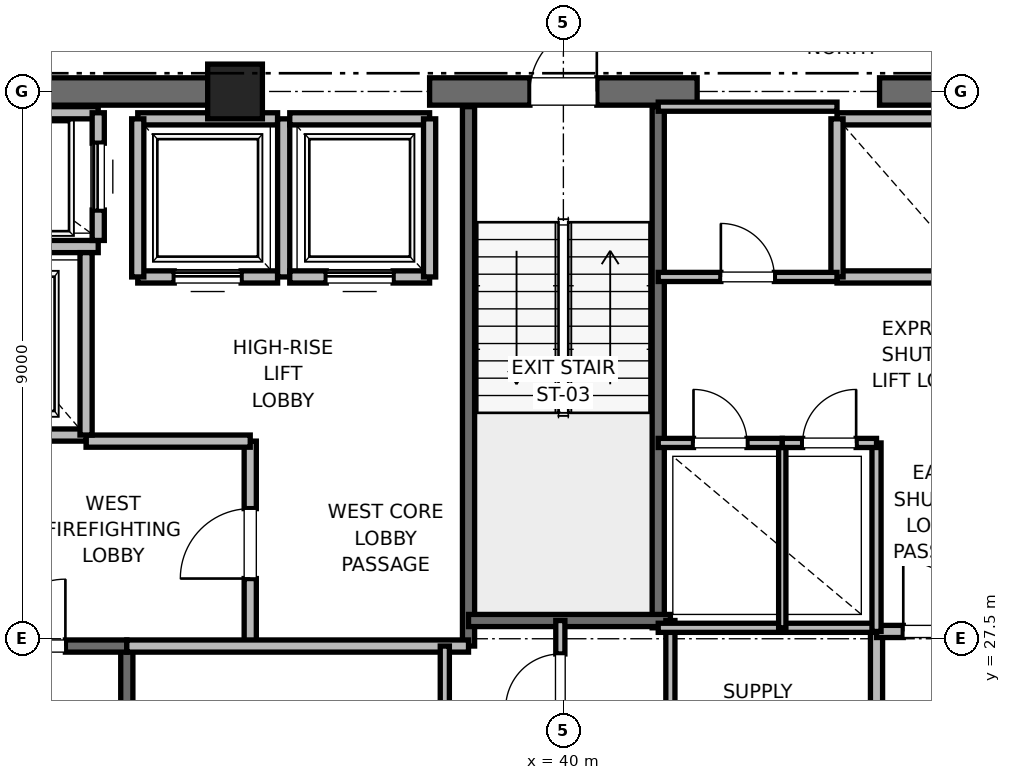
"""IFC4 building model, lengths in metres.
Left out: names, types, materials, properties, quantities, classifications, styles, units other than length and angle.
Written with IfcOpenShell. Run it as: python <this file> out.ifc"""

import sys

from ifc_helpers import new_model, si_unit, direction, frame, frame_2d, origin, origin_2d, place, context, subcontext, project, spatial, rectangle, extrude, element, fill, save


model = new_model("IFC4")
c1 = context("Model", 3, precision=1e-05, world=origin(), true_north=direction((0.0, 1.0)))
c2 = subcontext(c1, "Body", "Model", "MODEL_VIEW")
j1 = project(units=[si_unit("LENGTHUNIT", "METRE"), si_unit("PLANEANGLEUNIT", "RADIAN")], contexts=[c1])
p1 = place(None, origin())
s1 = spatial("IfcSite", under=j1, at=p1, CompositionType="ELEMENT")
p2 = place(p1, origin())
s2 = spatial("IfcBuilding", under=s1, at=p2, CompositionType="ELEMENT")
p3 = place(p2, frame((0.0, 0.0, 283.2)))
s3 = spatial("IfcBuildingStorey", under=s2, at=p3, CompositionType="ELEMENT", Elevation=283.2)
p4 = place(p3, frame((34.6, 36.5, 0.0), z_axis=(0.0, 0.0, 1.0), x_axis=(1.0, 0.0, 0.0)))
e1 = element("IfcColumn", 1, at=p4, inside=s3, PredefinedType="PILASTER", context=c2, shape_type="SweptSolid", body=[
    extrude(rectangle(XDim=0.9, YDim=0.9, at=origin_2d()), origin(), (0.0, 0.0, 1.0), 4.0),
])
p5 = place(p3, frame((29.0, 36.5, 0.0), z_axis=(0.0, 0.0, 1.0), x_axis=(1.0, 0.0, 0.0)))
e2 = element("IfcWall", 2, at=p5, inside=s3, PredefinedType="SHEAR", context=c2, shape_type="SweptSolid", body=[
    extrude(rectangle(XDim=5.8, YDim=0.45, at=frame_2d((2.9, 0.0))), origin(), (0.0, 0.0, 1.0), 3.785),
])
p6 = place(p3, frame((37.8, 36.5, 0.0), z_axis=(0.0, 0.0, 1.0), x_axis=(1.0, 0.0, 0.0)))
e3 = element("IfcWall", 3, at=p6, inside=s3, PredefinedType="SHEAR", context=c2, shape_type="SweptSolid", body=[
    extrude(rectangle(XDim=4.4, YDim=0.45, at=frame_2d((2.2, 0.0))), origin(), (0.0, 0.0, 1.0), 3.785),
])
p7 = place(p6, frame((1.65, 0.0, 0.0)))
e4 = element("IfcOpeningElement", 4, at=p7, cuts=e3, PredefinedType="OPENING", context=c2, shape_type="SweptSolid", body=[
    extrude(rectangle(XDim=1.1, YDim=2.15, at=frame_2d((0.55, 1.075))), frame((0.0, 0.225, 0.0), z_axis=(0.0, -1.0, 0.0), x_axis=(1.0, 0.0, 0.0)), (0.0, 0.0, 1.0), 0.45),
])
p8 = place(p3, frame((45.2, 36.5, 0.0), z_axis=(0.0, 0.0, 1.0), x_axis=(1.0, 0.0, 0.0)))
e5 = element("IfcWall", 5, at=p8, inside=s3, PredefinedType="SHEAR", context=c2, shape_type="SweptSolid", body=[
    extrude(rectangle(XDim=5.8, YDim=0.45, at=frame_2d((2.9, 0.0))), origin(), (0.0, 0.0, 1.0), 3.785),
])
p9 = place(p3, frame((32.82, 18.6, 0.0), z_axis=(0.0, 0.0, 1.0), x_axis=(0.0, 1.0, 0.0)))
e6 = element("IfcWall", 6, at=p9, inside=s3, PredefinedType="SOLIDWALL", context=c2, shape_type="SweptSolid", body=[
    extrude(rectangle(XDim=8.78, YDim=0.2, at=frame_2d((4.39, 0.0))), origin(), (0.0, 0.0, 1.0), 3.785),
])
p10 = place(p3, frame((29.7, 27.38, 0.0), z_axis=(0.0, 0.0, 1.0), x_axis=(1.0, 0.0, 0.0)))
e7 = element("IfcWall", 7, at=p10, inside=s3, PredefinedType="SOLIDWALL", context=c2, shape_type="SweptSolid", body=[
    extrude(rectangle(XDim=3.12, YDim=0.2, at=frame_2d((1.56, 0.0))), origin(), (0.0, 0.0, 1.0), 3.785),
])
p11 = place(p10, frame((1.01, 0.0, 0.0)))
e8 = element("IfcOpeningElement", 8, at=p11, cuts=e7, PredefinedType="OPENING", context=c2, shape_type="SweptSolid", body=[
    extrude(rectangle(XDim=1.1, YDim=2.15, at=frame_2d((0.55, 1.075))), frame((0.0, 0.1, 0.0), z_axis=(0.0, -1.0, 0.0), x_axis=(1.0, 0.0, 0.0)), (0.0, 0.0, 1.0), 0.2),
])
p12 = place(p3, frame((38.44, 27.38, 0.0), z_axis=(0.0, 0.0, 1.0), x_axis=(0.0, 1.0, 0.0)))
e9 = element("IfcWall", 9, at=p12, inside=s3, PredefinedType="SOLIDWALL", context=c2, shape_type="SweptSolid", body=[
    extrude(rectangle(XDim=8.87, YDim=0.2, at=frame_2d((4.435, 0.0))), origin(), (0.0, 0.0, 1.0), 3.785),
])
p13 = place(p3, frame((41.56, 27.68, 0.0), z_axis=(0.0, 0.0, 1.0), x_axis=(0.0, 1.0, 0.0)))
e10 = element("IfcWall", 10, at=p13, inside=s3, PredefinedType="SOLIDWALL", context=c2, shape_type="SweptSolid", body=[
    extrude(rectangle(XDim=8.57, YDim=0.2, at=frame_2d((4.285, 0.0))), origin(), (0.0, 0.0, 1.0), 3.785),
])
p14 = place(p3, frame((38.44, 27.8, 0.0), z_axis=(0.0, 0.0, 1.0), x_axis=(1.0, 0.0, 0.0)))
e11 = element("IfcWall", 11, at=p14, inside=s3, PredefinedType="SOLIDWALL", context=c2, shape_type="SweptSolid", body=[
    extrude(rectangle(XDim=3.32, YDim=0.2, at=frame_2d((1.66, 0.0))), origin(), (0.0, 0.0, 1.0), 3.785),
])
p15 = place(p3, frame((34.85, 27.38, 0.0), z_axis=(0.0, 0.0, 1.0), x_axis=(0.0, 1.0, 0.0)))
e12 = element("IfcWall", 12, at=p15, inside=s3, PredefinedType="PARTITIONING", context=c2, shape_type="SweptSolid", body=[
    extrude(rectangle(XDim=3.37, YDim=0.2, at=frame_2d((1.685, 0.0))), origin(), (0.0, 0.0, 1.0), 3.785),
])
p16 = place(p15, frame((1.11, 0.0, 0.0)))
e13 = element("IfcOpeningElement", 13, at=p16, cuts=e12, PredefinedType="OPENING", context=c2, shape_type="SweptSolid", body=[
    extrude(rectangle(XDim=1.15, YDim=2.2, at=frame_2d((0.575, 1.1))), frame((0.0, 0.1, 0.0), z_axis=(0.0, -1.0, 0.0), x_axis=(1.0, 0.0, 0.0)), (0.0, 0.0, 1.0), 0.2),
])
p17 = place(p3, frame((32.82, 27.38, 0.0), z_axis=(0.0, 0.0, 1.0), x_axis=(1.0, 0.0, 0.0)))
e14 = element("IfcWall", 14, at=p17, inside=s3, PredefinedType="PARTITIONING", context=c2, shape_type="SweptSolid", body=[
    extrude(rectangle(XDim=5.62, YDim=0.2, at=frame_2d((2.81, 0.0))), origin(), (0.0, 0.0, 1.0), 3.785),
])
p18 = place(p3, frame((32.15, 30.75, 0.0), z_axis=(0.0, 0.0, 1.0), x_axis=(1.0, 0.0, 0.0)))
e15 = element("IfcWall", 15, at=p18, inside=s3, PredefinedType="PARTITIONING", context=c2, shape_type="SweptSolid", body=[
    extrude(rectangle(XDim=2.7, YDim=0.2, at=frame_2d((1.35, 0.0))), origin(), (0.0, 0.0, 1.0), 3.785),
])
p19 = place(p3, frame((45.15, 24.25, 0.0), z_axis=(0.0, 0.0, 1.0), x_axis=(0.0, 1.0, 0.0)))
e16 = element("IfcWall", 16, at=p19, inside=s3, PredefinedType="PARTITIONING", context=c2, shape_type="SweptSolid", body=[
    extrude(rectangle(XDim=3.37, YDim=0.2, at=frame_2d((1.685, 0.0))), origin(), (0.0, 0.0, 1.0), 3.785),
])
p20 = place(p3, frame((45.15, 27.62, 0.0), z_axis=(0.0, 0.0, 1.0), x_axis=(1.0, 0.0, 0.0)))
e17 = element("IfcWall", 17, at=p20, inside=s3, PredefinedType="PARTITIONING", context=c2, shape_type="SweptSolid", body=[
    extrude(rectangle(XDim=2.03, YDim=0.2, at=frame_2d((1.015, 0.0))), origin(), (0.0, 0.0, 1.0), 3.785),
])
p21 = place(p20, frame((0.44, 0.0, 0.0)))
e18 = element("IfcOpeningElement", 18, at=p21, cuts=e17, PredefinedType="OPENING", context=c2, shape_type="SweptSolid", body=[
    extrude(rectangle(XDim=1.15, YDim=2.2, at=frame_2d((0.575, 1.1))), frame((0.0, 0.1, 0.0), z_axis=(0.0, -1.0, 0.0), x_axis=(1.0, 0.0, 0.0)), (0.0, 0.0, 1.0), 0.2),
])
p22 = place(p3, frame((29.55, 30.85, 0.0), z_axis=(0.0, 0.0, 1.0), x_axis=(1.0, 0.0, 0.0)))
e19 = element("IfcWall", 19, at=p22, inside=s3, PredefinedType="SOLIDWALL", context=c2, shape_type="SweptSolid", body=[
    extrude(rectangle(XDim=2.6, YDim=0.2, at=frame_2d((1.3, 0.0))), origin(), (0.0, 0.0, 1.0), 2.865),
])
p23 = place(p22, frame((0.75, 0.0, 0.0)))
e20 = element("IfcOpeningElement", 20, at=p23, cuts=e19, PredefinedType="OPENING", context=c2, shape_type="SweptSolid", body=[
    extrude(rectangle(XDim=1.1, YDim=2.2, at=frame_2d((0.55, 1.1))), frame((0.0, 0.1, 0.0), z_axis=(0.0, -1.0, 0.0), x_axis=(1.0, 0.0, 0.0)), (0.0, 0.0, 1.0), 0.2),
])
p24 = place(p3, frame((29.55, 33.95, 0.0), z_axis=(0.0, 0.0, 1.0), x_axis=(1.0, 0.0, 0.0)))
e21 = element("IfcWall", 21, at=p24, inside=s3, PredefinedType="SOLIDWALL", context=c2, shape_type="SweptSolid", body=[
    extrude(rectangle(XDim=2.8, YDim=0.2, at=frame_2d((1.4, 0.0))), origin(), (0.0, 0.0, 1.0), 3.785),
])
p25 = place(p3, frame((32.15, 30.85, 0.0), z_axis=(0.0, 0.0, 1.0), x_axis=(0.0, 1.0, 0.0)))
e22 = element("IfcWall", 22, at=p25, inside=s3, PredefinedType="SOLIDWALL", context=c2, shape_type="SweptSolid", body=[
    extrude(rectangle(XDim=3.0, YDim=0.2, at=frame_2d((1.5, 0.0))), origin(), (0.0, 0.0, 1.0), 3.785),
])
p26 = place(p3, frame((32.35, 36.15, 0.0), z_axis=(0.0, 0.0, 1.0), x_axis=(-1.0, 0.0, 0.0)))
e23 = element("IfcWall", 23, at=p26, inside=s3, PredefinedType="SOLIDWALL", context=c2, shape_type="SweptSolid", body=[
    extrude(rectangle(XDim=2.8, YDim=0.2, at=frame_2d((1.4, 0.0))), origin(), (0.0, 0.0, 1.0), 3.148),
])
p27 = place(p3, frame((32.35, 34.05, 0.0), z_axis=(0.0, 0.0, 1.0), x_axis=(0.0, 1.0, 0.0)))
e24 = element("IfcWall", 24, at=p27, inside=s3, PredefinedType="SOLIDWALL", context=c2, shape_type="SweptSolid", body=[
    extrude(rectangle(XDim=2.1, YDim=0.2, at=frame_2d((1.05, 0.0))), origin(), (0.0, 0.0, 1.0), 3.785),
])
p28 = place(p27, frame((0.5, 0.0, 0.0)))
e25 = element("IfcOpeningElement", 25, at=p28, cuts=e24, PredefinedType="OPENING", context=c2, shape_type="SweptSolid", body=[
    extrude(rectangle(XDim=1.1, YDim=2.2, at=frame_2d((0.55, 1.1))), frame((0.0, 0.1, 0.0), z_axis=(0.0, -1.0, 0.0), x_axis=(1.0, 0.0, 0.0)), (0.0, 0.0, 1.0), 0.2),
])
p29 = place(p3, frame((33.0, 33.45, 0.0), z_axis=(0.0, 0.0, 1.0), x_axis=(1.0, 0.0, 0.0)))
e26 = element("IfcWall", 26, at=p29, inside=s3, PredefinedType="SOLIDWALL", context=c2, shape_type="SweptSolid", body=[
    extrude(rectangle(XDim=2.3, YDim=0.2, at=frame_2d((1.15, 0.0))), origin(), (0.0, 0.0, 1.0), 3.785),
])
p30 = place(p29, frame((0.6, 0.0, 0.0)))
e27 = element("IfcOpeningElement", 27, at=p30, cuts=e26, PredefinedType="OPENING", context=c2, shape_type="SweptSolid", body=[
    extrude(rectangle(XDim=1.1, YDim=2.2, at=frame_2d((0.55, 1.1))), frame((0.0, 0.1, 0.0), z_axis=(0.0, -1.0, 0.0), x_axis=(1.0, 0.0, 0.0)), (0.0, 0.0, 1.0), 0.2),
])
p31 = place(p3, frame((35.3, 36.05, 0.0), z_axis=(0.0, 0.0, 1.0), x_axis=(-1.0, 0.0, 0.0)))
e28 = element("IfcWall", 28, at=p31, inside=s3, PredefinedType="SOLIDWALL", context=c2, shape_type="SweptSolid", body=[
    extrude(rectangle(XDim=2.3, YDim=0.2, at=frame_2d((1.15, 0.0))), origin(), (0.0, 0.0, 1.0), 2.865),
])
p32 = place(p3, frame((33.0, 36.05, 0.0), z_axis=(0.0, 0.0, 1.0), x_axis=(0.0, -1.0, 0.0)))
e29 = element("IfcWall", 29, at=p32, inside=s3, PredefinedType="SOLIDWALL", context=c2, shape_type="SweptSolid", body=[
    extrude(rectangle(XDim=2.6, YDim=0.2, at=frame_2d((1.3, 0.0))), origin(), (0.0, 0.0, 1.0), 3.785),
])
p33 = place(p3, frame((35.4, 33.45, 0.0), z_axis=(0.0, 0.0, 1.0), x_axis=(0.0, 1.0, 0.0)))
e30 = element("IfcWall", 30, at=p33, inside=s3, PredefinedType="SOLIDWALL", context=c2, shape_type="SweptSolid", body=[
    extrude(rectangle(XDim=2.6, YDim=0.2, at=frame_2d((1.3, 0.0))), origin(), (0.0, 0.0, 1.0), 2.865),
])
p34 = place(p3, frame((35.5, 33.45, 0.0), z_axis=(0.0, 0.0, 1.0), x_axis=(1.0, 0.0, 0.0)))
e31 = element("IfcWall", 31, at=p34, inside=s3, PredefinedType="SOLIDWALL", context=c2, shape_type="SweptSolid", body=[
    extrude(rectangle(XDim=2.3, YDim=0.2, at=frame_2d((1.15, 0.0))), origin(), (0.0, 0.0, 1.0), 3.785),
])
p35 = place(p34, frame((0.6, 0.0, 0.0)))
e32 = element("IfcOpeningElement", 32, at=p35, cuts=e31, PredefinedType="OPENING", context=c2, shape_type="SweptSolid", body=[
    extrude(rectangle(XDim=1.1, YDim=2.2, at=frame_2d((0.55, 1.1))), frame((0.0, 0.1, 0.0), z_axis=(0.0, -1.0, 0.0), x_axis=(1.0, 0.0, 0.0)), (0.0, 0.0, 1.0), 0.2),
])
p36 = place(p3, frame((37.8, 36.05, 0.0), z_axis=(0.0, 0.0, 1.0), x_axis=(-1.0, 0.0, 0.0)))
e33 = element("IfcWall", 33, at=p36, inside=s3, PredefinedType="SOLIDWALL", context=c2, shape_type="SweptSolid", body=[
    extrude(rectangle(XDim=2.3, YDim=0.2, at=frame_2d((1.15, 0.0))), origin(), (0.0, 0.0, 1.0), 2.865),
])
p37 = place(p3, frame((37.8, 33.45, 0.0), z_axis=(0.0, 0.0, 1.0), x_axis=(0.0, 1.0, 0.0)))
e34 = element("IfcWall", 34, at=p37, inside=s3, PredefinedType="SOLIDWALL", context=c2, shape_type="SweptSolid", body=[
    extrude(rectangle(XDim=2.6, YDim=0.2, at=frame_2d((1.3, 0.0))), origin(), (0.0, 0.0, 1.0), 2.865),
])
p38 = place(p3, frame((44.5, 33.45, 0.0), z_axis=(0.0, 0.0, 1.0), x_axis=(1.0, 0.0, 0.0)))
e35 = element("IfcWall", 35, at=p38, inside=s3, PredefinedType="SOLIDWALL", context=c2, shape_type="SweptSolid", body=[
    extrude(rectangle(XDim=2.3, YDim=0.2, at=frame_2d((1.15, 0.0))), origin(), (0.0, 0.0, 1.0), 3.785),
])
p39 = place(p3, frame((46.8, 36.05, 0.0), z_axis=(0.0, 0.0, 1.0), x_axis=(-1.0, 0.0, 0.0)))
e36 = element("IfcWall", 36, at=p39, inside=s3, PredefinedType="SOLIDWALL", context=c2, shape_type="SweptSolid", body=[
    extrude(rectangle(XDim=2.3, YDim=0.2, at=frame_2d((1.15, 0.0))), origin(), (0.0, 0.0, 1.0), 2.865),
])
p40 = place(p3, frame((44.5, 36.05, 0.0), z_axis=(0.0, 0.0, 1.0), x_axis=(0.0, -1.0, 0.0)))
e37 = element("IfcWall", 37, at=p40, inside=s3, PredefinedType="SOLIDWALL", context=c2, shape_type="SweptSolid", body=[
    extrude(rectangle(XDim=2.6, YDim=0.2, at=frame_2d((1.3, 0.0))), origin(), (0.0, 0.0, 1.0), 2.865),
])
p41 = place(p3, frame((41.76, 23.8, 0.0), z_axis=(0.0, 0.0, 1.0), x_axis=(0.0, 1.0, 0.0)))
e38 = element("IfcWall", 38, at=p41, inside=s3, PredefinedType="PARTITIONING", context=c2, shape_type="SweptSolid", body=[
    extrude(rectangle(XDim=4.0, YDim=0.15, at=frame_2d((2.0, 0.0))), origin(), (0.0, 0.0, 1.0), 2.85),
])
p42 = place(p3, frame((39.95, 25.8, 0.0), z_axis=(0.0, 0.0, 1.0), x_axis=(0.0, 1.0, 0.0)))
e39 = element("IfcWall", 39, at=p42, inside=s3, PredefinedType="PARTITIONING", context=c2, shape_type="SweptSolid", body=[
    extrude(rectangle(XDim=2.0, YDim=0.15, at=frame_2d((1.0, 0.0))), origin(), (0.0, 0.0, 1.0), 2.85),
])
p43 = place(p42, frame((0.55, 0.0, 0.0)))
e40 = element("IfcOpeningElement", 40, at=p43, cuts=e39, PredefinedType="OPENING", context=c2, shape_type="SweptSolid", body=[
    extrude(rectangle(XDim=0.9, YDim=2.1, at=frame_2d((0.45, 1.05))), frame((0.0, 0.075, 0.0), z_axis=(0.0, -1.0, 0.0), x_axis=(1.0, 0.0, 0.0)), (0.0, 0.0, 1.0), 0.15),
])
p44 = place(p3, frame((38.05, 24.5, 0.0), z_axis=(0.0, 0.0, 1.0), x_axis=(0.0, 1.0, 0.0)))
e41 = element("IfcWall", 41, at=p44, inside=s3, PredefinedType="PARTITIONING", context=c2, shape_type="SweptSolid", body=[
    extrude(rectangle(XDim=2.88, YDim=0.15, at=frame_2d((1.44, 0.0))), origin(), (0.0, 0.0, 1.0), 2.85),
])
p45 = place(p44, frame((0.94, 0.0, 0.0)))
e42 = element("IfcOpeningElement", 42, at=p45, cuts=e41, PredefinedType="OPENING", context=c2, shape_type="SweptSolid", body=[
    extrude(rectangle(XDim=1.0, YDim=2.15, at=frame_2d((0.5, 1.075))), frame((0.0, 0.075, 0.0), z_axis=(0.0, -1.0, 0.0), x_axis=(1.0, 0.0, 0.0)), (0.0, 0.0, 1.0), 0.15),
])
p46 = place(p3, frame((41.56, 27.68, 0.0), z_axis=(0.0, 0.0, 1.0), x_axis=(1.0, 0.0, 0.0)))
e43 = element("IfcWall", 43, at=p46, inside=s3, PredefinedType="PARTITIONING", context=c2, shape_type="SweptSolid", body=[
    extrude(rectangle(XDim=3.59, YDim=0.15, at=frame_2d((1.795, 0.0))), origin(), (0.0, 0.0, 1.0), 2.85),
])
p47 = place(p3, frame((45.15, 27.62, 0.0), z_axis=(0.0, 0.0, 1.0), x_axis=(0.0, 1.0, 0.0)))
e44 = element("IfcWall", 44, at=p47, inside=s3, PredefinedType="PARTITIONING", context=c2, shape_type="SweptSolid", body=[
    extrude(rectangle(XDim=3.1, YDim=0.15, at=frame_2d((1.55, 0.0))), origin(), (0.0, 0.0, 1.0), 2.85),
])
p48 = place(p3, frame((43.6, 27.68, 0.0), z_axis=(0.0, 0.0, 1.0), x_axis=(0.0, 1.0, 0.0)))
e45 = element("IfcWall", 45, at=p48, inside=s3, PredefinedType="PARTITIONING", context=c2, shape_type="SweptSolid", body=[
    extrude(rectangle(XDim=3.04, YDim=0.12, at=frame_2d((1.52, 0.0))), origin(), (0.0, 0.0, 1.0), 2.85),
])
p49 = place(p3, frame((41.56, 30.72, 0.0), z_axis=(0.0, 0.0, 1.0), x_axis=(1.0, 0.0, 0.0)))
e46 = element("IfcWall", 46, at=p49, inside=s3, PredefinedType="PARTITIONING", context=c2, shape_type="SweptSolid", body=[
    extrude(rectangle(XDim=2.04, YDim=0.15, at=frame_2d((1.02, 0.0))), origin(), (0.0, 0.0, 1.0), 2.85),
])
p50 = place(p49, frame((0.58, 0.0, 0.0)))
e47 = element("IfcOpeningElement", 47, at=p50, cuts=e46, PredefinedType="OPENING", context=c2, shape_type="SweptSolid", body=[
    extrude(rectangle(XDim=0.88, YDim=2.1, at=frame_2d((0.44, 1.05))), frame((0.0, 0.075, 0.0), z_axis=(0.0, -1.0, 0.0), x_axis=(1.0, 0.0, 0.0)), (0.0, 0.0, 1.0), 0.15),
])
p51 = place(p3, frame((43.6, 30.72, 0.0), z_axis=(0.0, 0.0, 1.0), x_axis=(1.0, 0.0, 0.0)))
e48 = element("IfcWall", 48, at=p51, inside=s3, PredefinedType="PARTITIONING", context=c2, shape_type="SweptSolid", body=[
    extrude(rectangle(XDim=1.55, YDim=0.15, at=frame_2d((0.775, 0.0))), origin(), (0.0, 0.0, 1.0), 2.85),
])
p52 = place(p51, frame((0.335, 0.0, 0.0)))
e49 = element("IfcOpeningElement", 49, at=p52, cuts=e48, PredefinedType="OPENING", context=c2, shape_type="SweptSolid", body=[
    extrude(rectangle(XDim=0.88, YDim=2.1, at=frame_2d((0.44, 1.05))), frame((0.0, 0.075, 0.0), z_axis=(0.0, -1.0, 0.0), x_axis=(1.0, 0.0, 0.0)), (0.0, 0.0, 1.0), 0.15),
])
p53 = place(p3, frame((41.56, 36.25, 0.0), z_axis=(0.0, 0.0, 1.0), x_axis=(1.0, 0.0, 0.0)))
e50 = element("IfcWall", 50, at=p53, inside=s3, PredefinedType="PARTITIONING", context=c2, shape_type="SweptSolid", body=[
    extrude(rectangle(XDim=2.94, YDim=0.15, at=frame_2d((1.47, 0.0))), origin(), (0.0, 0.0, 1.0), 2.85),
])
p54 = place(p3, frame((41.56, 33.45, 0.0), z_axis=(0.0, 0.0, 1.0), x_axis=(1.0, 0.0, 0.0)))
e51 = element("IfcWall", 51, at=p54, inside=s3, PredefinedType="PARTITIONING", context=c2, shape_type="SweptSolid", body=[
    extrude(rectangle(XDim=2.94, YDim=0.15, at=frame_2d((1.47, 0.0))), origin(), (0.0, 0.0, 1.0), 2.85),
])
p55 = place(p54, frame((1.03, 0.0, 0.0)))
e52 = element("IfcOpeningElement", 52, at=p55, cuts=e51, PredefinedType="OPENING", context=c2, shape_type="SweptSolid", body=[
    extrude(rectangle(XDim=0.88, YDim=2.1, at=frame_2d((0.44, 1.05))), frame((0.0, 0.075, 0.0), z_axis=(0.0, -1.0, 0.0), x_axis=(1.0, 0.0, 0.0)), (0.0, 0.0, 1.0), 0.15),
])
p56 = place(p11, origin())
e53 = element("IfcDoor", 53, at=p56, inside=s3, OperationType="SINGLE_SWING_RIGHT", PredefinedType="DOOR", context=c2, shape_type="SweptSolid", body=[
    extrude(rectangle(XDim=1.1, YDim=2.15, at=frame_2d((0.55, 1.075))), frame((0.0, 0.025, 0.0), z_axis=(0.0, -1.0, 0.0), x_axis=(1.0, 0.0, 0.0)), (0.0, 0.0, 1.0), 0.05),
])
fill(e8, e53)
p57 = place(p7, origin())
e54 = element("IfcDoor", 54, at=p57, inside=s3, OperationType="SINGLE_SWING_RIGHT", PredefinedType="DOOR", context=c2, shape_type="SweptSolid", body=[
    extrude(rectangle(XDim=1.1, YDim=2.15, at=frame_2d((0.55, 1.075))), frame((0.0, 0.025, 0.0), z_axis=(0.0, -1.0, 0.0), x_axis=(1.0, 0.0, 0.0)), (0.0, 0.0, 1.0), 0.05),
])
fill(e4, e54)
p58 = place(p16, origin())
e55 = element("IfcDoor", 55, at=p58, inside=s3, OperationType="SINGLE_SWING_LEFT", PredefinedType="DOOR", context=c2, shape_type="SweptSolid", body=[
    extrude(rectangle(XDim=1.15, YDim=2.2, at=frame_2d((0.575, 1.1))), frame((0.0, 0.025, 0.0), z_axis=(0.0, -1.0, 0.0), x_axis=(1.0, 0.0, 0.0)), (0.0, 0.0, 1.0), 0.05),
])
fill(e13, e55)
p59 = place(p21, origin())
e56 = element("IfcDoor", 56, at=p59, inside=s3, OperationType="SINGLE_SWING_LEFT", PredefinedType="DOOR", context=c2, shape_type="SweptSolid", body=[
    extrude(rectangle(XDim=1.15, YDim=2.2, at=frame_2d((0.575, 1.1))), frame((0.0, 0.025, 0.0), z_axis=(0.0, -1.0, 0.0), x_axis=(1.0, 0.0, 0.0)), (0.0, 0.0, 1.0), 0.05),
])
fill(e18, e56)
p60 = place(p28, origin())
e57 = element("IfcDoor", 57, at=p60, inside=s3, OperationType="SLIDING_TO_RIGHT", PredefinedType="DOOR", context=c2, shape_type="SweptSolid", body=[
    extrude(rectangle(XDim=1.1, YDim=2.2, at=frame_2d((0.55, 1.1))), frame((0.0, 0.025, 0.0), z_axis=(0.0, -1.0, 0.0), x_axis=(1.0, 0.0, 0.0)), (0.0, 0.0, 1.0), 0.05),
])
fill(e25, e57)
p61 = place(p30, origin())
e58 = element("IfcDoor", 58, at=p61, inside=s3, OperationType="SLIDING_TO_RIGHT", PredefinedType="DOOR", context=c2, shape_type="SweptSolid", body=[
    extrude(rectangle(XDim=1.1, YDim=2.2, at=frame_2d((0.55, 1.1))), frame((0.0, 0.025, 0.0), z_axis=(0.0, -1.0, 0.0), x_axis=(1.0, 0.0, 0.0)), (0.0, 0.0, 1.0), 0.05),
])
fill(e27, e58)
p62 = place(p35, origin())
e59 = element("IfcDoor", 59, at=p62, inside=s3, OperationType="SLIDING_TO_RIGHT", PredefinedType="DOOR", context=c2, shape_type="SweptSolid", body=[
    extrude(rectangle(XDim=1.1, YDim=2.2, at=frame_2d((0.55, 1.1))), frame((0.0, 0.025, 0.0), z_axis=(0.0, -1.0, 0.0), x_axis=(1.0, 0.0, 0.0)), (0.0, 0.0, 1.0), 0.05),
])
fill(e32, e59)
p63 = place(p43, origin())
e60 = element("IfcDoor", 60, at=p63, inside=s3, OperationType="SINGLE_SWING_LEFT", PredefinedType="DOOR", context=c2, shape_type="SweptSolid", body=[
    extrude(rectangle(XDim=0.9, YDim=2.1, at=frame_2d((0.45, 1.05))), frame((0.0, 0.025, 0.0), z_axis=(0.0, -1.0, 0.0), x_axis=(1.0, 0.0, 0.0)), (0.0, 0.0, 1.0), 0.05),
])
fill(e40, e60)
p64 = place(p50, origin())
e61 = element("IfcDoor", 61, at=p64, inside=s3, OperationType="SINGLE_SWING_LEFT", PredefinedType="DOOR", context=c2, shape_type="SweptSolid", body=[
    extrude(rectangle(XDim=0.88, YDim=2.1, at=frame_2d((0.44, 1.05))), frame((0.0, 0.025, 0.0), z_axis=(0.0, -1.0, 0.0), x_axis=(1.0, 0.0, 0.0)), (0.0, 0.0, 1.0), 0.05),
])
fill(e47, e61)
p65 = place(p52, origin())
e62 = element("IfcDoor", 62, at=p65, inside=s3, OperationType="SINGLE_SWING_RIGHT", PredefinedType="DOOR", context=c2, shape_type="SweptSolid", body=[
    extrude(rectangle(XDim=0.88, YDim=2.1, at=frame_2d((0.44, 1.05))), frame((0.0, 0.025, 0.0), z_axis=(0.0, -1.0, 0.0), x_axis=(1.0, 0.0, 0.0)), (0.0, 0.0, 1.0), 0.05),
])
fill(e49, e62)
p66 = place(p55, origin())
e63 = element("IfcDoor", 63, at=p66, inside=s3, OperationType="SINGLE_SWING_LEFT", PredefinedType="DOOR", context=c2, shape_type="SweptSolid", body=[
    extrude(rectangle(XDim=0.88, YDim=2.1, at=frame_2d((0.44, 1.05))), frame((0.0, 0.025, 0.0), z_axis=(0.0, -1.0, 0.0), x_axis=(1.0, 0.0, 0.0)), (0.0, 0.0, 1.0), 0.05),
])
fill(e52, e63)
save(model, sys.argv[1])
